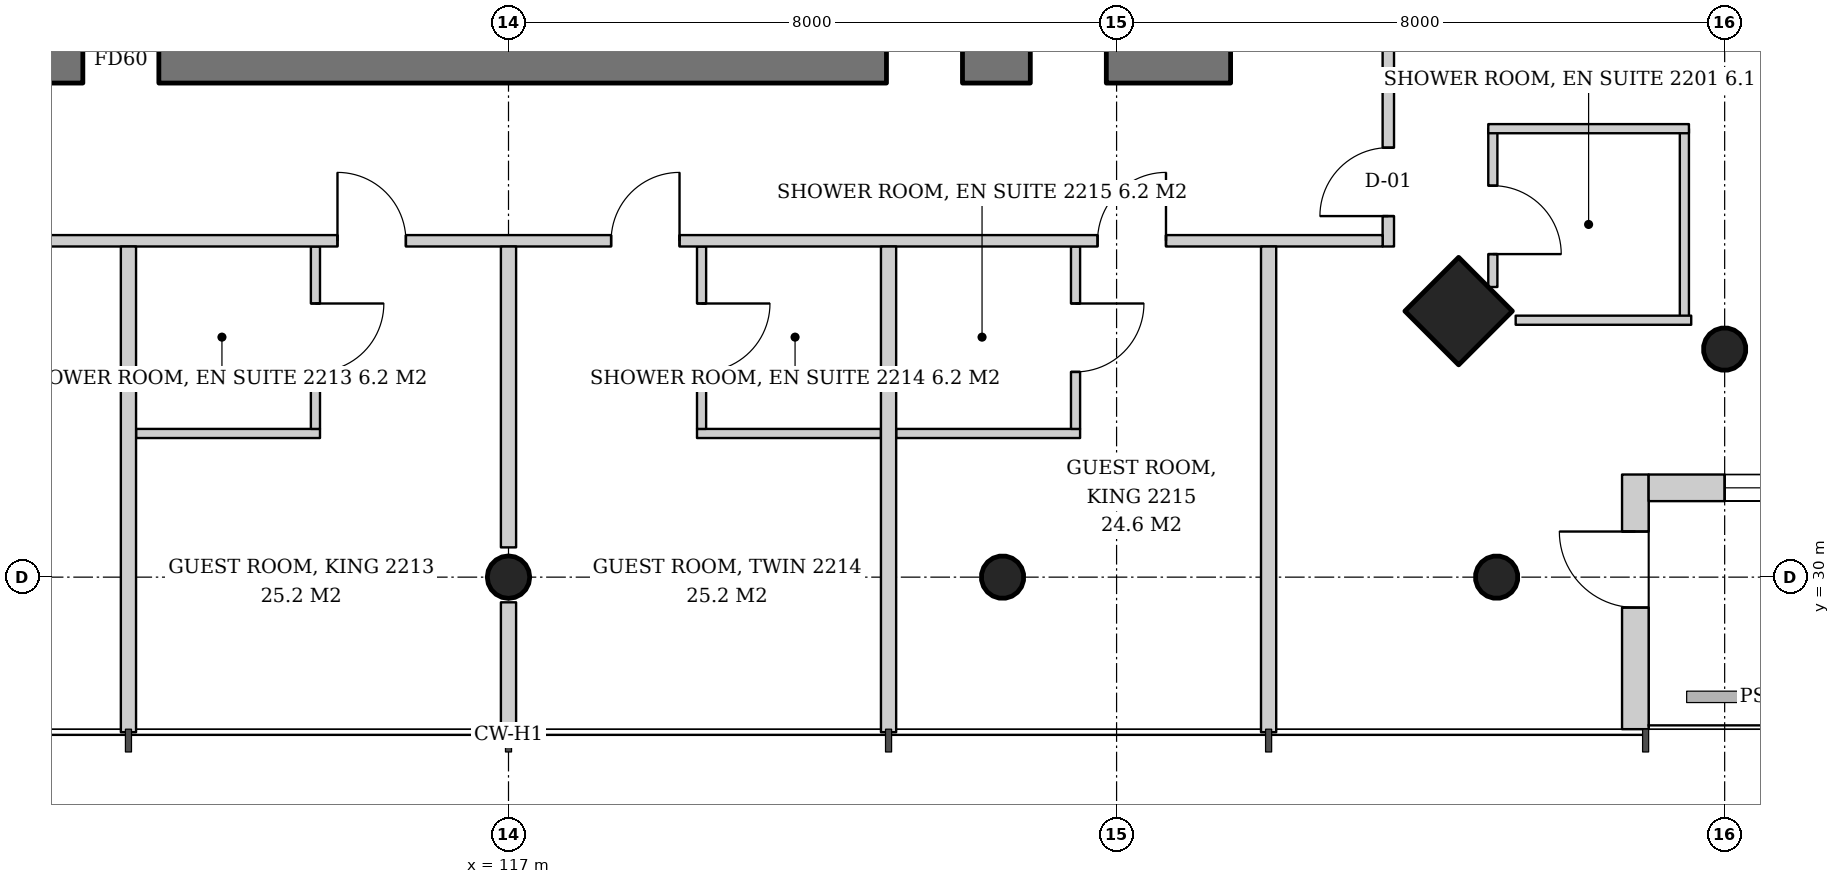
"""IFC4 building model, lengths in metres.
Left out: names, types, materials, properties, quantities, classifications, styles, units other than length and angle.
Written with IfcOpenShell. Run it as: python <this file> out.ifc"""

import sys

from ifc_helpers import new_model, si_unit, direction, frame, frame_2d, origin, origin_2d, place, context, subcontext, project, spatial, rectangle, hollow_circle, extrude, element, fill, save


model = new_model("IFC4")
c1 = context("Model", 3, precision=1e-05, world=origin(), true_north=direction((0.0, 1.0)))
c2 = subcontext(c1, "Body", "Model", "MODEL_VIEW")
j1 = project(units=[si_unit("LENGTHUNIT", "METRE"), si_unit("PLANEANGLEUNIT", "RADIAN")], contexts=[c1])
p1 = place(None, origin())
s1 = spatial("IfcSite", under=j1, at=p1, CompositionType="ELEMENT")
p2 = place(p1, origin())
s2 = spatial("IfcBuilding", under=s1, at=p2, CompositionType="ELEMENT")
p3 = place(p2, frame((0.0, 0.0, 89.4)))
s3 = spatial("IfcBuildingStorey", under=s2, at=p3, CompositionType="ELEMENT", Elevation=89.4)
p4 = place(p3, frame((133.052, 32.948, 0.0), z_axis=(-0.043029647111, 0.043029647111, 0.998146732169), x_axis=(-0.707106781187, -0.707106781187, 0.0)))
e1 = element("IfcColumn", 1, at=p4, inside=s3, PredefinedType="COLUMN", context=c2, shape_type="SweptSolid", body=[
    extrude(hollow_circle(Radius=0.28, WallThickness=0.02, at=origin_2d()), origin(), (0.0, 0.0, 1.0), 3.807),
])
p5 = place(p3, frame((129.552, 33.448, 0.0), z_axis=(-0.043029647111, 0.043029647111, 0.998146732169), x_axis=(-0.707106781187, -0.707106781187, 0.0)))
e2 = element("IfcColumn", 2, at=p5, inside=s3, PredefinedType="COLUMN", context=c2, shape_type="SweptSolid", body=[
    extrude(rectangle(XDim=1.0, YDim=1.0, at=origin_2d()), origin(), (0.0, 0.0, 1.0), 3.807),
])
p6 = place(p3, frame((130.052, 29.948, 0.0), z_axis=(-0.043029647111, 0.043029647111, 0.998146732169), x_axis=(-0.707106781187, -0.707106781187, 0.0)))
e3 = element("IfcColumn", 3, at=p6, inside=s3, PredefinedType="COLUMN", context=c2, shape_type="SweptSolid", body=[
    extrude(hollow_circle(Radius=0.28, WallThickness=0.02, at=origin_2d()), origin(), (0.0, 0.0, 1.0), 3.807),
])
p7 = place(p3, frame((117.0, 29.948, 0.0), z_axis=(0.0, 0.043069538298, 0.999072076915), x_axis=(-1.0, 0.0, 0.0)))
e4 = element("IfcColumn", 4, at=p7, inside=s3, PredefinedType="COLUMN", context=c2, shape_type="SweptSolid", body=[
    extrude(hollow_circle(Radius=0.28, WallThickness=0.02, at=origin_2d()), origin(), (0.0, 0.0, 1.0), 3.803),
])
p8 = place(p3, frame((123.526, 29.948, 0.0), z_axis=(-0.021561848751, 0.043059525333, 0.998839808957), x_axis=(-0.894160516368, -0.44774654769, 0.0)))
e5 = element("IfcColumn", 5, at=p8, inside=s3, PredefinedType="COLUMN", context=c2, shape_type="SweptSolid", body=[
    extrude(hollow_circle(Radius=0.28, WallThickness=0.02, at=origin_2d()), origin(), (0.0, 0.0, 1.0), 3.804),
])
p9 = place(p3, frame((107.5, 36.8, 0.0), z_axis=(0.0, 0.0, 1.0), x_axis=(1.0, 0.0, 0.0)))
e6 = element("IfcWall", 6, at=p9, inside=s3, PredefinedType="SHEAR", context=c2, shape_type="SweptSolid", body=[
    extrude(rectangle(XDim=19.0, YDim=0.6, at=frame_2d((9.5, 0.0))), origin(), (0.0, 0.0, 1.0), 3.8),
])
p10 = place(p9, frame((3.9, 0.0, 0.0)))
e7 = element("IfcOpeningElement", 7, at=p10, cuts=e6, PredefinedType="OPENING", context=c2, shape_type="SweptSolid", body=[
    extrude(rectangle(XDim=1.0, YDim=2.1, at=frame_2d((0.5, 1.05))), frame((0.0, 0.31, 0.0), z_axis=(0.0, -1.0, 0.0), x_axis=(1.0, 0.0, 0.0)), (0.0, 0.0, 1.0), 0.62),
])
p11 = place(p9, frame((14.472, 0.0, 0.0)))
e8 = element("IfcOpeningElement", 8, at=p11, cuts=e6, PredefinedType="OPENING", context=c2, shape_type="SweptSolid", body=[
    extrude(rectangle(XDim=1.0, YDim=2.1, at=frame_2d((0.5, 1.05))), frame((0.0, 0.31, 0.0), z_axis=(0.0, -1.0, 0.0), x_axis=(1.0, 0.0, 0.0)), (0.0, 0.0, 1.0), 0.62),
])
p12 = place(p9, frame((16.365, 0.0, 0.0)))
e9 = element("IfcOpeningElement", 9, at=p12, cuts=e6, PredefinedType="OPENING", context=c2, shape_type="SweptSolid", body=[
    extrude(rectangle(XDim=1.0, YDim=2.1, at=frame_2d((0.5, 1.05))), frame((0.0, 0.31, 0.0), z_axis=(0.0, -1.0, 0.0), x_axis=(1.0, 0.0, 0.0)), (0.0, 0.0, 1.0), 0.62),
])
p13 = place(p3, frame((131.825, 28.0, 0.0), z_axis=(0.0, 0.0, 1.0), x_axis=(0.0, 1.0, 0.0)))
e10 = element("IfcWall", 10, at=p13, inside=s3, PredefinedType="SOLIDWALL", context=c2, shape_type="SweptSolid", body=[
    extrude(rectangle(XDim=3.35, YDim=0.35, at=frame_2d((1.675, 0.0))), origin(), (0.0, 0.0, 1.0), 3.6),
])
p14 = place(p13, frame((1.6, 0.0, 0.0)))
e11 = element("IfcOpeningElement", 11, at=p14, cuts=e10, PredefinedType="OPENING", context=c2, shape_type="SweptSolid", body=[
    extrude(rectangle(XDim=1.0, YDim=2.4, at=frame_2d((0.5, 1.2))), frame((0.0, 0.185, 0.0), z_axis=(0.0, -1.0, 0.0), x_axis=(1.0, 0.0, 0.0)), (0.0, 0.0, 1.0), 0.37),
])
p15 = place(p3, frame((132.0, 31.175, 0.0), z_axis=(0.0, 0.0, 1.0), x_axis=(1.0, 0.0, 0.0)))
e12 = element("IfcWall", 12, at=p15, inside=s3, PredefinedType="SOLIDWALL", context=c2, shape_type="SweptSolid", body=[
    extrude(rectangle(XDim=3.0, YDim=0.35, at=frame_2d((1.5, 0.0))), origin(), (0.0, 0.0, 1.0), 3.6),
])
p16 = place(p15, frame((1.0, 0.0, 0.9)))
e13 = element("IfcOpeningElement", 13, at=p16, cuts=e12, PredefinedType="OPENING", context=c2, shape_type="SweptSolid", body=[
    extrude(rectangle(XDim=1.0, YDim=2.4, at=frame_2d((0.5, 1.2))), frame((0.0, 0.185, 0.0), z_axis=(0.0, -1.0, 0.0), x_axis=(1.0, 0.0, 0.0)), (0.0, 0.0, 1.0), 0.37),
])
p17 = place(p3, frame((129.95, 35.9, 0.0), z_axis=(0.0, 0.0, 1.0), x_axis=(0.0, -1.0, 0.0)))
e14 = element("IfcWall", 14, at=p17, inside=s3, PredefinedType="PARTITIONING", context=c2, shape_type="SweptSolid", body=[
    extrude(rectangle(XDim=2.083, YDim=0.12, at=frame_2d((1.042, 0.0))), origin(), (0.0, 0.0, 1.0), 3.6),
])
p18 = place(p17, frame((0.75, 0.0, 0.0)))
e15 = element("IfcOpeningElement", 15, at=p18, cuts=e14, PredefinedType="OPENING", context=c2, shape_type="SweptSolid", body=[
    extrude(rectangle(XDim=0.9, YDim=2.1, at=frame_2d((0.45, 1.05))), frame((0.0, 0.07, 0.0), z_axis=(0.0, -1.0, 0.0), x_axis=(1.0, 0.0, 0.0)), (0.0, 0.0, 1.0), 0.14),
])
p19 = place(p3, frame((132.47, 35.9, 0.0), z_axis=(0.0, 0.0, 1.0), x_axis=(0.0, -1.0, 0.0)))
e16 = element("IfcWall", 16, at=p19, inside=s3, PredefinedType="PARTITIONING", context=c2, shape_type="SweptSolid", body=[
    extrude(rectangle(XDim=2.58, YDim=0.12, at=frame_2d((1.29, 0.0))), origin(), (0.0, 0.0, 1.0), 3.2),
])
p20 = place(p3, frame((130.25, 33.38, 0.0), z_axis=(0.0, 0.0, 1.0), x_axis=(1.0, 0.0, 0.0)))
e17 = element("IfcWall", 17, at=p20, inside=s3, PredefinedType="PARTITIONING", context=c2, shape_type="SweptSolid", body=[
    extrude(rectangle(XDim=2.31, YDim=0.12, at=frame_2d((1.155, 0.0))), origin(), (0.0, 0.0, 1.0), 3.2),
])
p21 = place(p3, frame((129.89, 35.9, 0.0), z_axis=(0.0, 0.0, 1.0), x_axis=(1.0, 0.0, 0.0)))
e18 = element("IfcWall", 18, at=p21, inside=s3, PredefinedType="PARTITIONING", context=c2, shape_type="SweptSolid", body=[
    extrude(rectangle(XDim=2.64, YDim=0.12, at=frame_2d((1.32, 0.0))), origin(), (0.0, 0.0, 1.0), 3.6),
])
p22 = place(p3, frame((128.575, 34.35, 0.0), z_axis=(0.0, 0.0, 1.0), x_axis=(0.0, 1.0, 0.0)))
e19 = element("IfcWall", 19, at=p22, inside=s3, PredefinedType="PARTITIONING", context=c2, shape_type="SweptSolid", body=[
    extrude(rectangle(XDim=23.15, YDim=0.15, at=frame_2d((11.575, 0.0))), origin(), (0.0, 0.0, 1.0), 2.9),
])
p23 = place(p22, frame((0.4, 0.0, 0.0)))
e20 = element("IfcOpeningElement", 20, at=p23, cuts=e19, PredefinedType="OPENING", context=c2, shape_type="SweptSolid", body=[
    extrude(rectangle(XDim=0.9, YDim=2.1, at=frame_2d((0.45, 1.05))), frame((0.0, 0.085, 0.0), z_axis=(0.0, -1.0, 0.0), x_axis=(1.0, 0.0, 0.0)), (0.0, 0.0, 1.0), 0.17),
])
p24 = place(p22, frame((8.0, 0.0, 0.0)))
e21 = element("IfcOpeningElement", 21, at=p24, cuts=e19, PredefinedType="OPENING", context=c2, shape_type="SweptSolid", body=[
    extrude(rectangle(XDim=0.9, YDim=2.1, at=frame_2d((0.45, 1.05))), frame((0.0, 0.085, 0.0), z_axis=(0.0, -1.0, 0.0), x_axis=(1.0, 0.0, 0.0)), (0.0, 0.0, 1.0), 0.17),
])
p25 = place(p22, frame((14.4, 0.0, 0.0)))
e22 = element("IfcOpeningElement", 22, at=p25, cuts=e19, PredefinedType="OPENING", context=c2, shape_type="SweptSolid", body=[
    extrude(rectangle(XDim=0.9, YDim=2.1, at=frame_2d((0.45, 1.05))), frame((0.0, 0.085, 0.0), z_axis=(0.0, -1.0, 0.0), x_axis=(1.0, 0.0, 0.0)), (0.0, 0.0, 1.0), 0.17),
])
p26 = place(p22, frame((18.0, 0.0, 0.0)))
e23 = element("IfcOpeningElement", 23, at=p26, cuts=e19, PredefinedType="OPENING", context=c2, shape_type="SweptSolid", body=[
    extrude(rectangle(XDim=0.9, YDim=2.1, at=frame_2d((0.45, 1.05))), frame((0.0, 0.085, 0.0), z_axis=(0.0, -1.0, 0.0), x_axis=(1.0, 0.0, 0.0)), (0.0, 0.0, 1.0), 0.17),
])
p27 = place(p3, frame((112.1, 31.89, 0.0), z_axis=(0.0, 0.0, 1.0), x_axis=(1.0, 0.0, 0.0)))
e24 = element("IfcWall", 24, at=p27, inside=s3, PredefinedType="PARTITIONING", context=c2, shape_type="SweptSolid", body=[
    extrude(rectangle(XDim=2.42, YDim=0.12, at=frame_2d((1.21, 0.0))), origin(), (0.0, 0.0, 1.0), 3.6),
])
p28 = place(p3, frame((114.46, 34.35, 0.0), z_axis=(0.0, 0.0, 1.0), x_axis=(0.0, -1.0, 0.0)))
e25 = element("IfcWall", 25, at=p28, inside=s3, PredefinedType="PARTITIONING", context=c2, shape_type="SweptSolid", body=[
    extrude(rectangle(XDim=2.4, YDim=0.12, at=frame_2d((1.2, 0.0))), origin(), (0.0, 0.0, 1.0), 3.6),
])
p29 = place(p28, frame((0.75, 0.0, 0.0)))
e26 = element("IfcOpeningElement", 26, at=p29, cuts=e25, PredefinedType="OPENING", context=c2, shape_type="SweptSolid", body=[
    extrude(rectangle(XDim=0.9, YDim=2.1, at=frame_2d((0.45, 1.05))), frame((0.0, 0.07, 0.0), z_axis=(0.0, -1.0, 0.0), x_axis=(1.0, 0.0, 0.0)), (0.0, 0.0, 1.0), 0.14),
])
p30 = place(p3, frame((119.48, 31.89, 0.0), z_axis=(0.0, 0.0, 1.0), x_axis=(1.0, 0.0, 0.0)))
e27 = element("IfcWall", 27, at=p30, inside=s3, PredefinedType="PARTITIONING", context=c2, shape_type="SweptSolid", body=[
    extrude(rectangle(XDim=2.42, YDim=0.12, at=frame_2d((1.21, 0.0))), origin(), (0.0, 0.0, 1.0), 3.0),
])
p31 = place(p3, frame((119.54, 34.35, 0.0), z_axis=(0.0, 0.0, 1.0), x_axis=(0.0, -1.0, 0.0)))
e28 = element("IfcWall", 28, at=p31, inside=s3, PredefinedType="PARTITIONING", context=c2, shape_type="SweptSolid", body=[
    extrude(rectangle(XDim=2.4, YDim=0.12, at=frame_2d((1.2, 0.0))), origin(), (0.0, 0.0, 1.0), 3.6),
])
p32 = place(p31, frame((0.75, 0.0, 0.0)))
e29 = element("IfcOpeningElement", 29, at=p32, cuts=e28, PredefinedType="OPENING", context=c2, shape_type="SweptSolid", body=[
    extrude(rectangle(XDim=0.9, YDim=2.1, at=frame_2d((0.45, 1.05))), frame((0.0, 0.07, 0.0), z_axis=(0.0, -1.0, 0.0), x_axis=(1.0, 0.0, 0.0)), (0.0, 0.0, 1.0), 0.14),
])
p33 = place(p3, frame((122.1, 31.89, 0.0), z_axis=(0.0, 0.0, 1.0), x_axis=(1.0, 0.0, 0.0)))
e30 = element("IfcWall", 30, at=p33, inside=s3, PredefinedType="PARTITIONING", context=c2, shape_type="SweptSolid", body=[
    extrude(rectangle(XDim=2.42, YDim=0.12, at=frame_2d((1.21, 0.0))), origin(), (0.0, 0.0, 1.0), 3.0),
])
p34 = place(p3, frame((124.46, 34.35, 0.0), z_axis=(0.0, 0.0, 1.0), x_axis=(0.0, -1.0, 0.0)))
e31 = element("IfcWall", 31, at=p34, inside=s3, PredefinedType="PARTITIONING", context=c2, shape_type="SweptSolid", body=[
    extrude(rectangle(XDim=2.4, YDim=0.12, at=frame_2d((1.2, 0.0))), origin(), (0.0, 0.0, 1.0), 3.0),
])
p35 = place(p34, frame((0.75, 0.0, 0.0)))
e32 = element("IfcOpeningElement", 32, at=p35, cuts=e31, PredefinedType="OPENING", context=c2, shape_type="SweptSolid", body=[
    extrude(rectangle(XDim=0.9, YDim=2.1, at=frame_2d((0.45, 1.05))), frame((0.0, 0.07, 0.0), z_axis=(0.0, -1.0, 0.0), x_axis=(1.0, 0.0, 0.0)), (0.0, 0.0, 1.0), 0.14),
])
p36 = place(p3, frame((105.35, 34.425, 0.0), z_axis=(0.0, 0.0, 1.0), x_axis=(1.0, 0.0, 0.0)))
e33 = element("IfcWall", 33, at=p36, inside=s3, PredefinedType="PARTITIONING", context=c2, shape_type="SweptSolid", body=[
    extrude(rectangle(XDim=23.15, YDim=0.15, at=frame_2d((11.575, 0.0))), origin(), (0.0, 0.0, 1.0), 2.9),
])
p37 = place(p36, frame((0.4, 0.0, 0.0)))
e34 = element("IfcOpeningElement", 34, at=p37, cuts=e33, PredefinedType="OPENING", context=c2, shape_type="SweptSolid", body=[
    extrude(rectangle(XDim=0.9, YDim=2.1, at=frame_2d((0.45, 1.05))), frame((0.0, 0.085, 0.0), z_axis=(0.0, -1.0, 0.0), x_axis=(1.0, 0.0, 0.0)), (0.0, 0.0, 1.0), 0.17),
])
p38 = place(p36, frame((9.4, 0.0, 0.0)))
e35 = element("IfcOpeningElement", 35, at=p38, cuts=e33, PredefinedType="OPENING", context=c2, shape_type="SweptSolid", body=[
    extrude(rectangle(XDim=0.9, YDim=2.1, at=frame_2d((0.45, 1.05))), frame((0.0, 0.085, 0.0), z_axis=(0.0, -1.0, 0.0), x_axis=(1.0, 0.0, 0.0)), (0.0, 0.0, 1.0), 0.17),
])
p39 = place(p36, frame((13.0, 0.0, 0.0)))
e36 = element("IfcOpeningElement", 36, at=p39, cuts=e33, PredefinedType="OPENING", context=c2, shape_type="SweptSolid", body=[
    extrude(rectangle(XDim=0.9, YDim=2.1, at=frame_2d((0.45, 1.05))), frame((0.0, 0.085, 0.0), z_axis=(0.0, -1.0, 0.0), x_axis=(1.0, 0.0, 0.0)), (0.0, 0.0, 1.0), 0.17),
])
p40 = place(p36, frame((19.4, 0.0, 0.0)))
e37 = element("IfcOpeningElement", 37, at=p40, cuts=e33, PredefinedType="OPENING", context=c2, shape_type="SweptSolid", body=[
    extrude(rectangle(XDim=0.9, YDim=2.1, at=frame_2d((0.45, 1.05))), frame((0.0, 0.085, 0.0), z_axis=(0.0, -1.0, 0.0), x_axis=(1.0, 0.0, 0.0)), (0.0, 0.0, 1.0), 0.17),
])
p41 = place(p3, frame((112.0, 34.35, 0.0), z_axis=(0.0, 0.0, 1.0), x_axis=(0.0, -1.0, 0.0)))
e38 = element("IfcWall", 38, at=p41, inside=s3, PredefinedType="PARTITIONING", context=c2, shape_type="SweptSolid", body=[
    extrude(rectangle(XDim=6.39, YDim=0.2, at=frame_2d((3.195, 0.0))), origin(), (0.0, 0.0, 1.0), 3.0),
])
p42 = place(p3, frame((117.0, 34.35, 0.0), z_axis=(0.0, 0.0, 1.0), x_axis=(0.0, -1.0, 0.0)))
e39 = element("IfcWall", 39, at=p42, inside=s3, PredefinedType="PARTITIONING", context=c2, shape_type="SweptSolid", body=[
    extrude(rectangle(XDim=3.958, YDim=0.2, at=frame_2d((1.979, 0.0))), origin(), (0.0, 0.0, 1.0), 3.6),
])
p43 = place(p3, frame((117.0, 29.669, 0.0), z_axis=(0.0, 0.0, 1.0), x_axis=(0.0, -1.0, 0.0)))
e40 = element("IfcWall", 40, at=p43, inside=s3, PredefinedType="PARTITIONING", context=c2, shape_type="SweptSolid", body=[
    extrude(rectangle(XDim=1.709, YDim=0.2, at=frame_2d((0.854, 0.0))), origin(), (0.0, 0.0, 1.0), 3.6),
])
for number, where, z_axis, x_axis in (
    (41, (122.0, 34.35, 0.0), (0.0, 0.0, 1.0), (0.0, -1.0, 0.0)),
    (42, (127.0, 34.35, 0.0), (0.0, 0.0, 1.0), (0.0, -1.0, 0.0)),
):
    element("IfcWall", number, at=place(p3, frame(where, z_axis=z_axis, x_axis=x_axis)), inside=s3, PredefinedType="PARTITIONING", context=c2, shape_type="SweptSolid", body=[
        extrude(rectangle(XDim=6.39, YDim=0.2, at=frame_2d((3.195, 0.0))), origin(), (0.0, 0.0, 1.0), 3.2),
    ])
p44 = place(p14, origin())
e43 = element("IfcDoor", 43, at=p44, inside=s3, OperationType="SINGLE_SWING_RIGHT", PredefinedType="DOOR", context=c2, shape_type="SweptSolid", body=[
    extrude(rectangle(XDim=1.0, YDim=2.4, at=frame_2d((0.5, 1.2))), frame((0.0, 0.025, 0.0), z_axis=(0.0, -1.0, 0.0), x_axis=(1.0, 0.0, 0.0)), (0.0, 0.0, 1.0), 0.05),
])
fill(e11, e43)
p45 = place(p16, origin())
e44 = element("IfcWindow", 44, at=p45, inside=s3, PartitioningType="SINGLE_PANEL", PredefinedType="WINDOW", context=c2, shape_type="SweptSolid", body=[
    extrude(rectangle(XDim=1.0, YDim=2.4, at=frame_2d((0.5, 1.2))), frame((0.0, 0.03, 0.0), z_axis=(0.0, -1.0, 0.0), x_axis=(1.0, 0.0, 0.0)), (0.0, 0.0, 1.0), 0.06),
])
fill(e13, e44)
p46 = place(p10, origin())
e45 = element("IfcDoor", 45, at=p46, inside=s3, OperationType="SINGLE_SWING_LEFT", PredefinedType="DOOR", context=c2, shape_type="SweptSolid", body=[
    extrude(rectangle(XDim=1.0, YDim=2.1, at=frame_2d((0.5, 1.05))), frame((0.0, 0.025, 0.0), z_axis=(0.0, -1.0, 0.0), x_axis=(1.0, 0.0, 0.0)), (0.0, 0.0, 1.0), 0.05),
])
fill(e7, e45)
p47 = place(p18, origin())
e46 = element("IfcDoor", 46, at=p47, inside=s3, OperationType="SINGLE_SWING_RIGHT", PredefinedType="DOOR", context=c2, shape_type="SweptSolid", body=[
    extrude(rectangle(XDim=0.9, YDim=2.1, at=frame_2d((0.45, 1.05))), frame((0.0, 0.025, 0.0), z_axis=(0.0, -1.0, 0.0), x_axis=(1.0, 0.0, 0.0)), (0.0, 0.0, 1.0), 0.05),
])
fill(e15, e46)
p48 = place(p23, origin())
e47 = element("IfcDoor", 47, at=p48, inside=s3, OperationType="SINGLE_SWING_LEFT", PredefinedType="DOOR", context=c2, shape_type="SweptSolid", body=[
    extrude(rectangle(XDim=0.9, YDim=2.1, at=frame_2d((0.45, 1.05))), frame((0.0, 0.025, 0.0), z_axis=(0.0, -1.0, 0.0), x_axis=(1.0, 0.0, 0.0)), (0.0, 0.0, 1.0), 0.05),
])
fill(e20, e47)
p49 = place(p29, origin())
e48 = element("IfcDoor", 48, at=p49, inside=s3, OperationType="SINGLE_SWING_LEFT", PredefinedType="DOOR", context=c2, shape_type="SweptSolid", body=[
    extrude(rectangle(XDim=0.9, YDim=2.1, at=frame_2d((0.45, 1.05))), frame((0.0, 0.025, 0.0), z_axis=(0.0, -1.0, 0.0), x_axis=(1.0, 0.0, 0.0)), (0.0, 0.0, 1.0), 0.05),
])
fill(e26, e48)
p50 = place(p32, origin())
e49 = element("IfcDoor", 49, at=p50, inside=s3, OperationType="SINGLE_SWING_LEFT", PredefinedType="DOOR", context=c2, shape_type="SweptSolid", body=[
    extrude(rectangle(XDim=0.9, YDim=2.1, at=frame_2d((0.45, 1.05))), frame((0.0, 0.025, 0.0), z_axis=(0.0, -1.0, 0.0), x_axis=(1.0, 0.0, 0.0)), (0.0, 0.0, 1.0), 0.05),
])
fill(e29, e49)
p51 = place(p35, origin())
e50 = element("IfcDoor", 50, at=p51, inside=s3, OperationType="SINGLE_SWING_LEFT", PredefinedType="DOOR", context=c2, shape_type="SweptSolid", body=[
    extrude(rectangle(XDim=0.9, YDim=2.1, at=frame_2d((0.45, 1.05))), frame((0.0, 0.025, 0.0), z_axis=(0.0, -1.0, 0.0), x_axis=(1.0, 0.0, 0.0)), (0.0, 0.0, 1.0), 0.05),
])
fill(e32, e50)
p52 = place(p38, origin())
e51 = element("IfcDoor", 51, at=p52, inside=s3, OperationType="SINGLE_SWING_LEFT", PredefinedType="DOOR", context=c2, shape_type="SweptSolid", body=[
    extrude(rectangle(XDim=0.9, YDim=2.1, at=frame_2d((0.45, 1.05))), frame((0.0, 0.025, 0.0), z_axis=(0.0, -1.0, 0.0), x_axis=(1.0, 0.0, 0.0)), (0.0, 0.0, 1.0), 0.05),
])
fill(e35, e51)
p53 = place(p39, origin())
e52 = element("IfcDoor", 52, at=p53, inside=s3, OperationType="SINGLE_SWING_RIGHT", PredefinedType="DOOR", context=c2, shape_type="SweptSolid", body=[
    extrude(rectangle(XDim=0.9, YDim=2.1, at=frame_2d((0.45, 1.05))), frame((0.0, 0.025, 0.0), z_axis=(0.0, -1.0, 0.0), x_axis=(1.0, 0.0, 0.0)), (0.0, 0.0, 1.0), 0.05),
])
fill(e36, e52)
p54 = place(p40, origin())
e53 = element("IfcDoor", 53, at=p54, inside=s3, OperationType="SINGLE_SWING_RIGHT", PredefinedType="DOOR", context=c2, shape_type="SweptSolid", body=[
    extrude(rectangle(XDim=0.9, YDim=2.1, at=frame_2d((0.45, 1.05))), frame((0.0, 0.025, 0.0), z_axis=(0.0, -1.0, 0.0), x_axis=(1.0, 0.0, 0.0)), (0.0, 0.0, 1.0), 0.05),
])
fill(e37, e53)
save(model, sys.argv[1])
